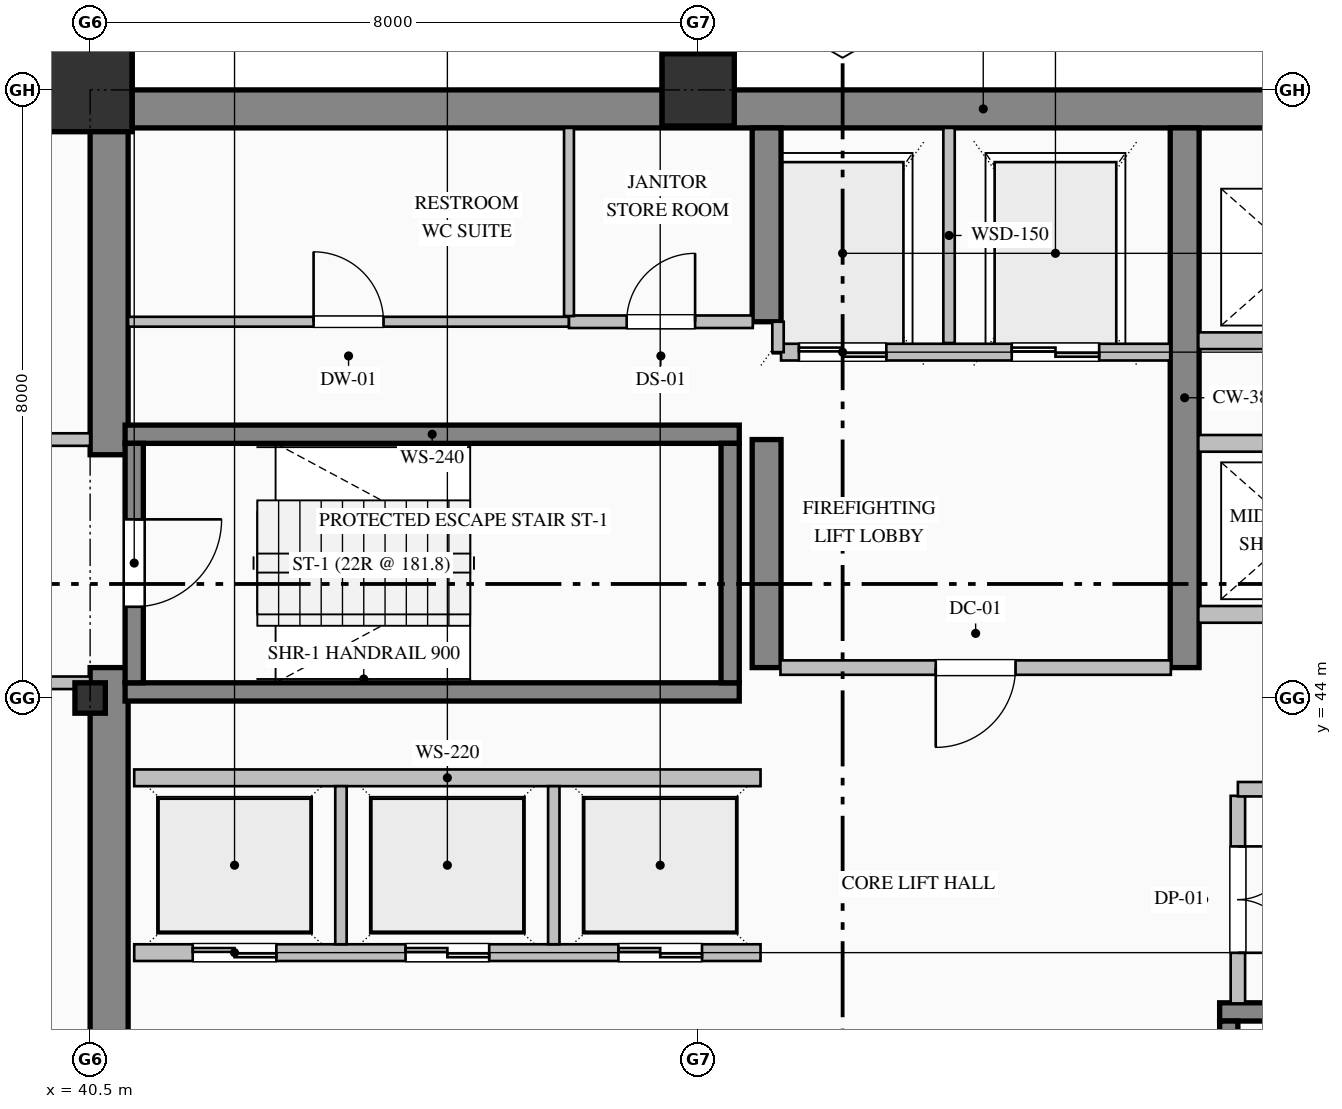
"""IFC4 building model, lengths in metres.
Left out: names, types, materials, properties, quantities, classifications, styles, units other than length and angle.
Written with IfcOpenShell. Run it as: python <this file> out.ifc"""

import sys

from ifc_helpers import new_model, si_unit, direction, frame, frame_2d, origin, origin_2d, place, context, subcontext, project, spatial, rectangle, hollow_rectangle, i_section, extrude, element, fill, save


model = new_model("IFC4")
c1 = context("Model", 3, precision=1e-05, world=origin(), true_north=direction((0.0, 1.0)))
c2 = subcontext(c1, "Body", "Model", "MODEL_VIEW")
j1 = project(units=[si_unit("LENGTHUNIT", "METRE"), si_unit("PLANEANGLEUNIT", "RADIAN")], contexts=[c1])
p1 = place(None, origin())
s1 = spatial("IfcSite", under=j1, at=p1, CompositionType="ELEMENT")
p2 = place(p1, origin())
s2 = spatial("IfcBuilding", under=s1, at=p2, CompositionType="ELEMENT")
p3 = place(p2, frame((0.0, 0.0, 175.0)))
s3 = spatial("IfcBuildingStorey", under=s2, at=p3, CompositionType="ELEMENT", Elevation=175.0)
p4 = place(p3, frame((40.5, 51.75, 0.0), z_axis=(0.0, 0.0, 1.0), x_axis=(1.0, 0.0, 0.0)))
e1 = element("IfcWall", 1, at=p4, inside=s3, PredefinedType="SHEAR", context=c2, shape_type="SweptSolid", body=[
    extrude(rectangle(XDim=23.5, YDim=0.5, at=frame_2d((11.75, 0.0))), origin(), (0.0, 0.0, 1.0), 3.765),
])
p5 = place(p3, frame((40.75, 36.5, 0.0), z_axis=(0.0, 0.0, 1.0), x_axis=(0.0, 1.0, 0.0)))
e2 = element("IfcWall", 2, at=p5, inside=s3, PredefinedType="SHEAR", context=c2, shape_type="SweptSolid", body=[
    extrude(rectangle(XDim=7.9, YDim=0.5, at=frame_2d((3.95, 0.0))), origin(), (0.0, 0.0, 1.0), 3.765),
])
p6 = place(p3, frame((40.75, 47.2, 0.0), z_axis=(0.0, 0.0, 1.0), x_axis=(0.0, 1.0, 0.0)))
e3 = element("IfcWall", 3, at=p6, inside=s3, PredefinedType="SHEAR", context=c2, shape_type="SweptSolid", body=[
    extrude(rectangle(XDim=4.3, YDim=0.5, at=frame_2d((2.15, 0.0))), origin(), (0.0, 0.0, 1.0), 3.765),
])
p7 = place(p3, frame((49.4, 44.4, 0.0), z_axis=(0.0, 0.0, 1.0), x_axis=(0.0, 1.0, 0.0)))
e4 = element("IfcWall", 4, at=p7, inside=s3, PredefinedType="SHEAR", context=c2, shape_type="SweptSolid", body=[
    extrude(rectangle(XDim=3.0, YDim=0.38, at=frame_2d((1.5, 0.0))), origin(), (0.0, 0.0, 1.0), 3.765),
])
p8 = place(p3, frame((49.4, 48.95, 0.0), z_axis=(0.0, 0.0, 1.0), x_axis=(0.0, 1.0, 0.0)))
e5 = element("IfcWall", 5, at=p8, inside=s3, PredefinedType="SHEAR", context=c2, shape_type="SweptSolid", body=[
    extrude(rectangle(XDim=2.55, YDim=0.38, at=frame_2d((1.275, 0.0))), origin(), (0.0, 0.0, 1.0), 3.765),
])
p9 = place(p3, frame((54.9, 44.4, 0.0), z_axis=(0.0, 0.0, 1.0), x_axis=(0.0, 1.0, 0.0)))
e6 = element("IfcWall", 6, at=p9, inside=s3, PredefinedType="SHEAR", context=c2, shape_type="SweptSolid", body=[
    extrude(rectangle(XDim=7.1, YDim=0.38, at=frame_2d((3.55, 0.0))), origin(), (0.0, 0.0, 1.0), 3.765),
])
p10 = place(p3, frame((40.5, 44.0, 0.0), z_axis=(0.0, 0.0, 1.0), x_axis=(1.0, 0.0, 0.0)))
e7 = element("IfcColumn", 7, at=p10, inside=s3, PredefinedType="COLUMN", context=c2, shape_type="SweptSolid", body=[
    extrude(i_section(OverallWidth=0.4, OverallDepth=0.4, WebThickness=0.013, FlangeThickness=0.021, FilletRadius=0.022, at=origin_2d()), origin(), (0.0, 0.0, 1.0), 4.0),
])
p11 = place(p3, frame((40.5, 52.0, 0.0), z_axis=(0.0, 0.0, 1.0), x_axis=(1.0, 0.0, 0.0)))
e8 = element("IfcColumn", 8, at=p11, inside=s3, PredefinedType="COLUMN", context=c2, shape_type="SweptSolid", body=[
    extrude(hollow_rectangle(XDim=1.1, YDim=1.1, WallThickness=0.04, at=origin_2d()), origin(), (0.0, 0.0, 1.0), 4.0),
])
p12 = place(p3, frame((48.5, 52.0, 0.0), z_axis=(0.0, 0.0, 1.0), x_axis=(1.0, 0.0, 0.0)))
e9 = element("IfcColumn", 9, at=p12, inside=s3, PredefinedType="COLUMN", context=c2, shape_type="SweptSolid", body=[
    extrude(hollow_rectangle(XDim=0.95, YDim=0.95, WallThickness=0.036, at=origin_2d()), origin(), (0.0, 0.0, 1.0), 4.0),
])
p13 = place(p3, frame((13.0, 51.82, 0.0), z_axis=(0.0, 0.0, 1.0), x_axis=(1.0, 0.0, 0.0)))
e10 = element("IfcWall", 10, at=p13, inside=s3, PredefinedType="SOLIDWALL", context=c2, shape_type="SweptSolid", body=[
    extrude(rectangle(XDim=27.52, YDim=0.36, at=frame_2d((13.76, 0.0))), origin(), (0.0, 0.0, 1.0), 3.265),
])
for number, where, z_axis, x_axis in (
    (11, (40.96, 47.47, 0.0), (0.0, 0.0, 1.0), (1.0, 0.0, 0.0)),
    (12, (49.04, 44.08, 0.0), (0.0, 0.0, 1.0), (-1.0, 0.0, 0.0)),
):
    element("IfcWall", number, at=place(p3, frame(where, z_axis=z_axis, x_axis=x_axis)), inside=s3, PredefinedType="SOLIDWALL", context=c2, shape_type="SweptSolid", body=[
        extrude(rectangle(XDim=8.08, YDim=0.24, at=frame_2d((4.04, 0.0))), origin(), (0.0, 0.0, 1.0), 4.0),
    ])
p14 = place(p3, frame((41.08, 47.35, 0.0), z_axis=(0.0, 0.0, 1.0), x_axis=(0.0, -1.0, 0.0)))
e13 = element("IfcWall", 13, at=p14, inside=s3, PredefinedType="SOLIDWALL", context=c2, shape_type="SweptSolid", body=[
    extrude(rectangle(XDim=3.15, YDim=0.24, at=frame_2d((1.575, 0.0))), origin(), (0.0, 0.0, 1.0), 4.0),
])
p15 = place(p14, frame((1.0, 0.0, 0.0)))
e14 = element("IfcOpeningElement", 14, at=p15, cuts=e13, PredefinedType="OPENING", context=c2, shape_type="SweptSolid", body=[
    extrude(rectangle(XDim=1.15, YDim=2.2, at=frame_2d((0.575, 1.1))), frame((0.0, 0.13, 0.0), z_axis=(0.0, -1.0, 0.0), x_axis=(1.0, 0.0, 0.0)), (0.0, 0.0, 1.0), 0.26),
])
p16 = place(p3, frame((48.92, 44.2, 0.0), z_axis=(0.0, 0.0, 1.0), x_axis=(0.0, 1.0, 0.0)))
e15 = element("IfcWall", 15, at=p16, inside=s3, PredefinedType="SOLIDWALL", context=c2, shape_type="SweptSolid", body=[
    extrude(rectangle(XDim=3.15, YDim=0.24, at=frame_2d((1.575, 0.0))), origin(), (0.0, 0.0, 1.0), 4.0),
])
p17 = place(p3, frame((55.36, 39.87, 0.0), z_axis=(0.0, 0.0, 1.0), x_axis=(1.0, 0.0, 0.0)))
e16 = element("IfcWall", 16, at=p17, inside=s3, PredefinedType="SOLIDWALL", context=c2, shape_type="SweptSolid", body=[
    extrude(rectangle(XDim=8.08, YDim=0.24, at=frame_2d((4.04, 0.0))), origin(), (0.0, 0.0, 1.0), 4.0),
])
p18 = place(p3, frame((55.48, 39.75, 0.0), z_axis=(0.0, 0.0, 1.0), x_axis=(0.0, -1.0, 0.0)))
e17 = element("IfcWall", 17, at=p18, inside=s3, PredefinedType="SOLIDWALL", context=c2, shape_type="SweptSolid", body=[
    extrude(rectangle(XDim=3.15, YDim=0.24, at=frame_2d((1.575, 0.0))), origin(), (0.0, 0.0, 1.0), 4.0),
])
p19 = place(p18, frame((1.0, 0.0, 0.0)))
e18 = element("IfcOpeningElement", 18, at=p19, cuts=e17, PredefinedType="OPENING", context=c2, shape_type="SweptSolid", body=[
    extrude(rectangle(XDim=1.15, YDim=2.2, at=frame_2d((0.575, 1.1))), frame((0.0, 0.13, 0.0), z_axis=(0.0, -1.0, 0.0), x_axis=(1.0, 0.0, 0.0)), (0.0, 0.0, 1.0), 0.26),
])
p20 = place(p3, frame((54.71, 48.55, 0.0), z_axis=(0.0, 0.0, 1.0), x_axis=(-1.0, 0.0, 0.0)))
e19 = element("IfcWall", 19, at=p20, inside=s3, PredefinedType="PARTITIONING", context=c2, shape_type="SweptSolid", body=[
    extrude(rectangle(XDim=5.12, YDim=0.22, at=frame_2d((2.56, 0.0))), origin(), (0.0, 0.0, 1.0), 3.765),
])
p21 = place(p20, frame((3.735, 0.0, 0.0)))
e20 = element("IfcOpeningElement", 20, at=p21, cuts=e19, PredefinedType="OPENING", context=c2, shape_type="SweptSolid", body=[
    extrude(rectangle(XDim=1.15, YDim=2.2, at=frame_2d((0.575, 1.1))), frame((0.0, 0.12, 0.0), z_axis=(0.0, -1.0, 0.0), x_axis=(1.0, 0.0, 0.0)), (0.0, 0.0, 1.0), 0.24),
])
p22 = place(p20, frame((0.935, 0.0, 0.0)))
e21 = element("IfcOpeningElement", 21, at=p22, cuts=e19, PredefinedType="OPENING", context=c2, shape_type="SweptSolid", body=[
    extrude(rectangle(XDim=1.15, YDim=2.2, at=frame_2d((0.575, 1.1))), frame((0.0, 0.12, 0.0), z_axis=(0.0, -1.0, 0.0), x_axis=(1.0, 0.0, 0.0)), (0.0, 0.0, 1.0), 0.24),
])
p23 = place(p3, frame((51.8, 48.67, 0.0), z_axis=(0.0, 0.0, 1.0), x_axis=(0.0, 1.0, 0.0)))
e22 = element("IfcWall", 22, at=p23, inside=s3, PredefinedType="PARTITIONING", context=c2, shape_type="SweptSolid", body=[
    extrude(rectangle(XDim=2.83, YDim=0.15, at=frame_2d((1.415, 0.0))), origin(), (0.0, 0.0, 1.0), 3.765),
])
p24 = place(p3, frame((49.55, 48.55, 0.0), z_axis=(0.0, 0.0, 1.0), x_axis=(0.0, 1.0, 0.0)))
e23 = element("IfcWall", 23, at=p24, inside=s3, PredefinedType="PARTITIONING", context=c2, shape_type="SweptSolid", body=[
    extrude(rectangle(XDim=0.4, YDim=0.15, at=frame_2d((0.2, 0.0))), origin(), (0.0, 0.0, 1.0), 3.765),
])
p25 = place(p3, frame((49.32, 40.65, 0.0), z_axis=(0.0, 0.0, 1.0), x_axis=(-1.0, 0.0, 0.0)))
e24 = element("IfcWall", 24, at=p25, inside=s3, PredefinedType="PARTITIONING", context=c2, shape_type="SweptSolid", body=[
    extrude(rectangle(XDim=8.24, YDim=0.22, at=frame_2d((4.12, 0.0))), origin(), (0.0, 0.0, 1.0), 3.765),
])
p26 = place(p25, frame((6.37, 0.0, 0.0)))
e25 = element("IfcOpeningElement", 25, at=p26, cuts=e24, PredefinedType="OPENING", context=c2, shape_type="SweptSolid", body=[
    extrude(rectangle(XDim=1.1, YDim=2.2, at=frame_2d((0.55, 1.1))), frame((0.0, 0.12, 0.0), z_axis=(0.0, -1.0, 0.0), x_axis=(1.0, 0.0, 0.0)), (0.0, 0.0, 1.0), 0.24),
])
p27 = place(p25, frame((3.57, 0.0, 0.0)))
e26 = element("IfcOpeningElement", 26, at=p27, cuts=e24, PredefinedType="OPENING", context=c2, shape_type="SweptSolid", body=[
    extrude(rectangle(XDim=1.1, YDim=2.2, at=frame_2d((0.55, 1.1))), frame((0.0, 0.12, 0.0), z_axis=(0.0, -1.0, 0.0), x_axis=(1.0, 0.0, 0.0)), (0.0, 0.0, 1.0), 0.24),
])
p28 = place(p25, frame((0.77, 0.0, 0.0)))
e27 = element("IfcOpeningElement", 27, at=p28, cuts=e24, PredefinedType="OPENING", context=c2, shape_type="SweptSolid", body=[
    extrude(rectangle(XDim=1.1, YDim=2.2, at=frame_2d((0.55, 1.1))), frame((0.0, 0.12, 0.0), z_axis=(0.0, -1.0, 0.0), x_axis=(1.0, 0.0, 0.0)), (0.0, 0.0, 1.0), 0.24),
])
p29 = place(p3, frame((41.08, 42.95, 0.0), z_axis=(0.0, 0.0, 1.0), x_axis=(1.0, 0.0, 0.0)))
e28 = element("IfcWall", 28, at=p29, inside=s3, PredefinedType="PARTITIONING", context=c2, shape_type="SweptSolid", body=[
    extrude(rectangle(XDim=8.24, YDim=0.22, at=frame_2d((4.12, 0.0))), origin(), (0.0, 0.0, 1.0), 3.765),
])
for number, where, z_axis, x_axis in (
    (29, (43.8, 40.76, 0.0), (0.0, 0.0, 1.0), (0.0, 1.0, 0.0)),
    (30, (46.6, 40.76, 0.0), (0.0, 0.0, 1.0), (0.0, 1.0, 0.0)),
):
    element("IfcWall", number, at=place(p3, frame(where, z_axis=z_axis, x_axis=x_axis)), inside=s3, PredefinedType="PARTITIONING", context=c2, shape_type="SweptSolid", body=[
        extrude(rectangle(XDim=2.08, YDim=0.15, at=frame_2d((1.04, 0.0))), origin(), (0.0, 0.0, 1.0), 3.765),
    ])
for number, where, z_axis, x_axis in (
    (31, (63.32, 45.1, 0.0), (0.0, 0.0, 1.0), (-1.0, 0.0, 0.0)),
    (32, (55.08, 47.35, 0.0), (0.0, 0.0, 1.0), (1.0, 0.0, 0.0)),
    (33, (63.32, 48.7, 0.0), (0.0, 0.0, 1.0), (-1.0, 0.0, 0.0)),
):
    element("IfcWall", number, at=place(p3, frame(where, z_axis=z_axis, x_axis=x_axis)), inside=s3, PredefinedType="PARTITIONING", context=c2, shape_type="SweptSolid", body=[
        extrude(rectangle(XDim=8.24, YDim=0.22, at=frame_2d((4.12, 0.0))), origin(), (0.0, 0.0, 1.0), 3.765),
    ])
p30 = place(p3, frame((37.8, 47.4, 0.0), z_axis=(0.0, 0.0, 1.0), x_axis=(1.0, 0.0, 0.0)))
e34 = element("IfcWall", 34, at=p30, inside=s3, PredefinedType="PARTITIONING", context=c2, shape_type="SweptSolid", body=[
    extrude(rectangle(XDim=2.7, YDim=0.165, at=frame_2d((1.35, 0.0))), origin(), (0.0, 0.0, 1.0), 3.765),
])
p31 = place(p30, frame((0.825, 0.0, 0.0)))
e35 = element("IfcOpeningElement", 35, at=p31, cuts=e34, PredefinedType="OPENING", context=c2, shape_type="SweptSolid", body=[
    extrude(rectangle(XDim=1.05, YDim=2.15, at=frame_2d((0.525, 1.075))), frame((0.0, 0.093, 0.0), z_axis=(0.0, -1.0, 0.0), x_axis=(1.0, 0.0, 0.0)), (0.0, 0.0, 1.0), 0.185),
])
p32 = place(p3, frame((40.5, 44.2, 0.0), z_axis=(0.0, 0.0, 1.0), x_axis=(-1.0, 0.0, 0.0)))
e36 = element("IfcWall", 36, at=p32, inside=s3, PredefinedType="PARTITIONING", context=c2, shape_type="SweptSolid", body=[
    extrude(rectangle(XDim=2.7, YDim=0.165, at=frame_2d((1.35, 0.0))), origin(), (0.0, 0.0, 1.0), 3.765),
])
p33 = place(p32, frame((0.825, 0.0, 0.0)))
e37 = element("IfcOpeningElement", 37, at=p33, cuts=e36, PredefinedType="OPENING", context=c2, shape_type="SweptSolid", body=[
    extrude(rectangle(XDim=1.05, YDim=2.15, at=frame_2d((0.525, 1.075))), frame((0.0, 0.093, 0.0), z_axis=(0.0, -1.0, 0.0), x_axis=(1.0, 0.0, 0.0)), (0.0, 0.0, 1.0), 0.185),
])
p34 = place(p3, frame((41.0, 48.95, 0.0), z_axis=(0.0, 0.0, 1.0), x_axis=(1.0, 0.0, 0.0)))
e38 = element("IfcWall", 38, at=p34, inside=s3, PredefinedType="PARTITIONING", context=c2, shape_type="SweptSolid", body=[
    extrude(rectangle(XDim=5.8, YDim=0.13, at=frame_2d((2.9, 0.0))), origin(), (0.0, 0.0, 1.0), 3.765),
])
p35 = place(p34, frame((2.44, 0.0, 0.0)))
e39 = element("IfcOpeningElement", 39, at=p35, cuts=e38, PredefinedType="OPENING", context=c2, shape_type="SweptSolid", body=[
    extrude(rectangle(XDim=0.92, YDim=2.15, at=frame_2d((0.46, 1.075))), frame((0.0, 0.075, 0.0), z_axis=(0.0, -1.0, 0.0), x_axis=(1.0, 0.0, 0.0)), (0.0, 0.0, 1.0), 0.15),
])
p36 = place(p3, frame((46.8, 48.95, 0.0), z_axis=(0.0, 0.0, 1.0), x_axis=(1.0, 0.0, 0.0)))
e40 = element("IfcWall", 40, at=p36, inside=s3, PredefinedType="PARTITIONING", context=c2, shape_type="SweptSolid", body=[
    extrude(rectangle(XDim=2.418, YDim=0.165, at=frame_2d((1.209, 0.0))), origin(), (0.0, 0.0, 1.0), 3.765),
])
p37 = place(p36, frame((0.759, 0.0, 0.0)))
e41 = element("IfcOpeningElement", 41, at=p37, cuts=e40, PredefinedType="OPENING", context=c2, shape_type="SweptSolid", body=[
    extrude(rectangle(XDim=0.9, YDim=2.15, at=frame_2d((0.45, 1.075))), frame((0.0, 0.093, 0.0), z_axis=(0.0, -1.0, 0.0), x_axis=(1.0, 0.0, 0.0)), (0.0, 0.0, 1.0), 0.185),
])
p38 = place(p3, frame((54.718, 44.4, 0.0), z_axis=(0.0, 0.0, 1.0), x_axis=(-1.0, 0.0, 0.0)))
e42 = element("IfcWall", 42, at=p38, inside=s3, PredefinedType="PARTITIONING", context=c2, shape_type="SweptSolid", body=[
    extrude(rectangle(XDim=5.136, YDim=0.19, at=frame_2d((2.568, 0.0))), origin(), (0.0, 0.0, 1.0), 3.765),
])
p39 = place(p38, frame((2.043, 0.0, 0.0)))
e43 = element("IfcOpeningElement", 43, at=p39, cuts=e42, PredefinedType="OPENING", context=c2, shape_type="SweptSolid", body=[
    extrude(rectangle(XDim=1.05, YDim=2.15, at=frame_2d((0.525, 1.075))), frame((0.0, 0.105, 0.0), z_axis=(0.0, -1.0, 0.0), x_axis=(1.0, 0.0, 0.0)), (0.0, 0.0, 1.0), 0.21),
])
p40 = place(p3, frame((55.6, 42.713, 0.0), z_axis=(0.0, 0.0, 1.0), x_axis=(0.0, -1.0, 0.0)))
e44 = element("IfcWall", 44, at=p40, inside=s3, PredefinedType="PARTITIONING", context=c2, shape_type="SweptSolid", body=[
    extrude(rectangle(XDim=2.731, YDim=0.19, at=frame_2d((1.365, 0.0))), origin(), (0.0, 0.0, 1.0), 3.765),
])
p41 = place(p40, frame((0.666, 0.0, 0.0)))
e45 = element("IfcOpeningElement", 45, at=p41, cuts=e44, PredefinedType="OPENING", context=c2, shape_type="SweptSolid", body=[
    extrude(rectangle(XDim=1.4, YDim=2.25, at=frame_2d((0.7, 1.125))), frame((0.0, 0.105, 0.0), z_axis=(0.0, -1.0, 0.0), x_axis=(1.0, 0.0, 0.0)), (0.0, 0.0, 1.0), 0.21),
])
p42 = place(p3, frame((58.2, 42.8, 0.0), z_axis=(0.0, 0.0, 1.0), x_axis=(-1.0, 0.0, 0.0)))
e46 = element("IfcWall", 46, at=p42, inside=s3, PredefinedType="PARTITIONING", context=c2, shape_type="SweptSolid", body=[
    extrude(rectangle(XDim=2.6, YDim=0.19, at=frame_2d((1.3, 0.0))), origin(), (0.0, 0.0, 1.0), 3.765),
])
p43 = place(p3, frame((46.8, 51.5, 0.0), z_axis=(0.0, 0.0, 1.0), x_axis=(0.0, -1.0, 0.0)))
e47 = element("IfcWall", 47, at=p43, inside=s3, PredefinedType="PARTITIONING", context=c2, shape_type="SweptSolid", body=[
    extrude(rectangle(XDim=2.476, YDim=0.13, at=frame_2d((1.238, 0.0))), origin(), (0.0, 0.0, 1.0), 3.765),
])
p44 = place(p15, origin())
e48 = element("IfcDoor", 48, at=p44, inside=s3, OperationType="SINGLE_SWING_LEFT", PredefinedType="DOOR", context=c2, shape_type="SweptSolid", body=[
    extrude(rectangle(XDim=1.15, YDim=2.2, at=frame_2d((0.575, 1.1))), frame((0.0, 0.025, 0.0), z_axis=(0.0, -1.0, 0.0), x_axis=(1.0, 0.0, 0.0)), (0.0, 0.0, 1.0), 0.05),
])
fill(e14, e48)
p45 = place(p21, origin())
e49 = element("IfcDoor", 49, at=p45, inside=s3, OperationType="DOUBLE_DOOR_SLIDING", PredefinedType="DOOR", context=c2, shape_type="SweptSolid", body=[
    extrude(rectangle(XDim=1.15, YDim=2.2, at=frame_2d((0.575, 1.1))), frame((0.0, 0.025, 0.0), z_axis=(0.0, -1.0, 0.0), x_axis=(1.0, 0.0, 0.0)), (0.0, 0.0, 1.0), 0.05),
])
fill(e20, e49)
p46 = place(p22, origin())
e50 = element("IfcDoor", 50, at=p46, inside=s3, OperationType="DOUBLE_DOOR_SLIDING", PredefinedType="DOOR", context=c2, shape_type="SweptSolid", body=[
    extrude(rectangle(XDim=1.15, YDim=2.2, at=frame_2d((0.575, 1.1))), frame((0.0, 0.025, 0.0), z_axis=(0.0, -1.0, 0.0), x_axis=(1.0, 0.0, 0.0)), (0.0, 0.0, 1.0), 0.05),
])
fill(e21, e50)
p47 = place(p26, origin())
e51 = element("IfcDoor", 51, at=p47, inside=s3, OperationType="DOUBLE_DOOR_SLIDING", PredefinedType="DOOR", context=c2, shape_type="SweptSolid", body=[
    extrude(rectangle(XDim=1.1, YDim=2.2, at=frame_2d((0.55, 1.1))), frame((0.0, 0.025, 0.0), z_axis=(0.0, -1.0, 0.0), x_axis=(1.0, 0.0, 0.0)), (0.0, 0.0, 1.0), 0.05),
])
fill(e25, e51)
p48 = place(p27, origin())
e52 = element("IfcDoor", 52, at=p48, inside=s3, OperationType="DOUBLE_DOOR_SLIDING", PredefinedType="DOOR", context=c2, shape_type="SweptSolid", body=[
    extrude(rectangle(XDim=1.1, YDim=2.2, at=frame_2d((0.55, 1.1))), frame((0.0, 0.025, 0.0), z_axis=(0.0, -1.0, 0.0), x_axis=(1.0, 0.0, 0.0)), (0.0, 0.0, 1.0), 0.05),
])
fill(e26, e52)
p49 = place(p28, origin())
e53 = element("IfcDoor", 53, at=p49, inside=s3, OperationType="DOUBLE_DOOR_SLIDING", PredefinedType="DOOR", context=c2, shape_type="SweptSolid", body=[
    extrude(rectangle(XDim=1.1, YDim=2.2, at=frame_2d((0.55, 1.1))), frame((0.0, 0.025, 0.0), z_axis=(0.0, -1.0, 0.0), x_axis=(1.0, 0.0, 0.0)), (0.0, 0.0, 1.0), 0.05),
])
fill(e27, e53)
p50 = place(p39, origin())
e54 = element("IfcDoor", 54, at=p50, inside=s3, OperationType="SINGLE_SWING_RIGHT", PredefinedType="DOOR", context=c2, shape_type="SweptSolid", body=[
    extrude(rectangle(XDim=1.05, YDim=2.15, at=frame_2d((0.525, 1.075))), frame((0.0, 0.025, 0.0), z_axis=(0.0, -1.0, 0.0), x_axis=(1.0, 0.0, 0.0)), (0.0, 0.0, 1.0), 0.05),
])
fill(e43, e54)
p51 = place(p35, origin())
e55 = element("IfcDoor", 55, at=p51, inside=s3, OperationType="SINGLE_SWING_LEFT", PredefinedType="DOOR", context=c2, shape_type="SweptSolid", body=[
    extrude(rectangle(XDim=0.92, YDim=2.15, at=frame_2d((0.46, 1.075))), frame((0.0, 0.025, 0.0), z_axis=(0.0, -1.0, 0.0), x_axis=(1.0, 0.0, 0.0)), (0.0, 0.0, 1.0), 0.05),
])
fill(e39, e55)
p52 = place(p37, origin())
e56 = element("IfcDoor", 56, at=p52, inside=s3, OperationType="SINGLE_SWING_RIGHT", PredefinedType="DOOR", context=c2, shape_type="SweptSolid", body=[
    extrude(rectangle(XDim=0.9, YDim=2.15, at=frame_2d((0.45, 1.075))), frame((0.0, 0.025, 0.0), z_axis=(0.0, -1.0, 0.0), x_axis=(1.0, 0.0, 0.0)), (0.0, 0.0, 1.0), 0.05),
])
fill(e41, e56)
p53 = place(p41, origin())
e57 = element("IfcDoor", 57, at=p53, inside=s3, OperationType="DOUBLE_DOOR_SINGLE_SWING", PredefinedType="DOOR", context=c2, shape_type="SweptSolid", body=[
    extrude(rectangle(XDim=1.4, YDim=2.25, at=frame_2d((0.7, 1.125))), frame((0.0, 0.025, 0.0), z_axis=(0.0, -1.0, 0.0), x_axis=(1.0, 0.0, 0.0)), (0.0, 0.0, 1.0), 0.05),
])
fill(e45, e57)
save(model, sys.argv[1])
